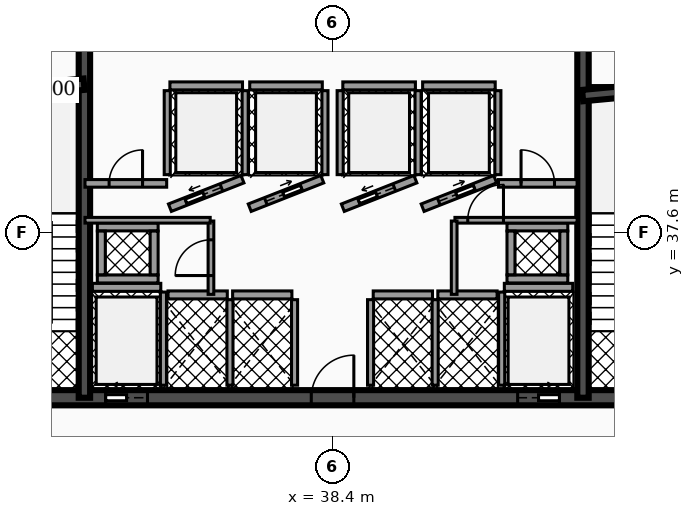
"""IFC4 building model, lengths in metres.
Left out: names, types, materials, properties, quantities, classifications, styles, units other than length and angle.
Written with IfcOpenShell. Run it as: python <this file> out.ifc"""

import sys

from ifc_helpers import new_model, si_unit, direction, frame, frame_2d, origin, place, context, subcontext, project, spatial, rectangle, extrude, element, fill, save


model = new_model("IFC4")
c1 = context("Model", 3, precision=1e-05, world=origin(), true_north=direction((0.0, 1.0)))
c2 = subcontext(c1, "Body", "Model", "MODEL_VIEW")
j1 = project(units=[si_unit("LENGTHUNIT", "METRE"), si_unit("PLANEANGLEUNIT", "RADIAN")], contexts=[c1])
p1 = place(None, origin())
s1 = spatial("IfcSite", under=j1, at=p1, CompositionType="ELEMENT")
p2 = place(p1, origin())
s2 = spatial("IfcBuilding", under=s1, at=p2, CompositionType="ELEMENT")
p3 = place(p2, frame((0.0, 0.0, 68.34)))
s3 = spatial("IfcBuildingStorey", under=s2, at=p3, CompositionType="ELEMENT", Elevation=68.34)
p4 = place(p3, frame((28.4, 33.25, 0.0), z_axis=(0.0, 0.0, 1.0), x_axis=(1.0, 0.0, 0.0)))
e1 = element("IfcWall", 1, at=p4, inside=s3, PredefinedType="SHEAR", context=c2, shape_type="SweptSolid", body=[
    extrude(rectangle(XDim=20.06, YDim=0.4, at=frame_2d((10.03, 0.0))), origin(), (0.0, 0.0, 1.0), 3.82),
])
p5 = place(p4, frame((4.03, 0.0, 0.0)))
e2 = element("IfcOpeningElement", 2, at=p5, cuts=e1, PredefinedType="OPENING", context=c2, shape_type="SweptSolid", body=[
    extrude(rectangle(XDim=1.1, YDim=2.15, at=frame_2d((0.55, 1.075))), frame((0.0, 0.21, 0.0), z_axis=(0.0, -1.0, 0.0), x_axis=(1.0, 0.0, 0.0)), (0.0, 0.0, 1.0), 0.42),
])
p6 = place(p4, frame((14.87, 0.0, 0.0)))
e3 = element("IfcOpeningElement", 3, at=p6, cuts=e1, PredefinedType="OPENING", context=c2, shape_type="SweptSolid", body=[
    extrude(rectangle(XDim=1.1, YDim=2.15, at=frame_2d((0.55, 1.075))), frame((0.0, 0.21, 0.0), z_axis=(0.0, -1.0, 0.0), x_axis=(1.0, 0.0, 0.0)), (0.0, 0.0, 1.0), 0.42),
])
p7 = place(p4, frame((1.31, 0.0, 0.0)))
e4 = element("IfcOpeningElement", 4, at=p7, cuts=e1, PredefinedType="OPENING", context=c2, shape_type="SweptSolid", body=[
    extrude(rectangle(XDim=1.1, YDim=2.2, at=frame_2d((0.55, 1.1))), frame((0.0, 0.21, 0.0), z_axis=(0.0, -1.0, 0.0), x_axis=(1.0, 0.0, 0.0)), (0.0, 0.0, 1.0), 0.42),
])
p8 = place(p4, frame((9.44, 0.0, 0.0)))
e5 = element("IfcOpeningElement", 5, at=p8, cuts=e1, PredefinedType="OPENING", context=c2, shape_type="SweptSolid", body=[
    extrude(rectangle(XDim=1.12, YDim=2.05, at=frame_2d((0.56, 1.025))), frame((0.0, 0.21, 0.0), z_axis=(0.0, -1.0, 0.0), x_axis=(1.0, 0.0, 0.0)), (0.0, 0.0, 1.0), 0.42),
])
p9 = place(p4, frame((17.65, 0.0, 0.0)))
e6 = element("IfcOpeningElement", 6, at=p9, cuts=e1, PredefinedType="OPENING", context=c2, shape_type="SweptSolid", body=[
    extrude(rectangle(XDim=1.1, YDim=2.2, at=frame_2d((0.55, 1.1))), frame((0.0, 0.21, 0.0), z_axis=(0.0, -1.0, 0.0), x_axis=(1.0, 0.0, 0.0)), (0.0, 0.0, 1.0), 0.42),
])
for number, where, z_axis, x_axis in (
    (7, (31.87, 33.25, 0.0), (0.0, 0.0, 1.0), (0.0, 1.0, 0.0)),
    (8, (44.99, 33.25, 0.0), (0.0, 0.0, 1.0), (0.0, 1.0, 0.0)),
):
    element("IfcWall", number, at=place(p3, frame(where, z_axis=z_axis, x_axis=x_axis)), inside=s3, PredefinedType="SHEAR", context=c2, shape_type="SweptSolid", body=[
        extrude(rectangle(XDim=10.2, YDim=0.3, at=frame_2d((5.1, 0.0))), origin(), (0.0, 0.0, 1.0), 3.82),
    ])
p10 = place(p3, frame((28.64, 41.2, 0.0), z_axis=(0.0, 0.0, 1.0), x_axis=(0.995687118776, 0.092774789157, 0.0)))
e9 = element("IfcWall", 9, at=p10, inside=s3, PredefinedType="SHEAR", context=c2, shape_type="SweptSolid", body=[
    extrude(rectangle(XDim=3.234, YDim=0.3, at=frame_2d((1.617, 0.0))), origin(), (0.0, 0.0, 1.0), 3.82),
])
p11 = place(p3, frame((44.98, 41.2, 0.0), z_axis=(0.0, 0.0, 1.0), x_axis=(0.995686468965, 0.09278176286, 0.0)))
e10 = element("IfcWall", 10, at=p11, inside=s3, PredefinedType="SHEAR", context=c2, shape_type="SweptSolid", body=[
    extrude(rectangle(XDim=3.234, YDim=0.3, at=frame_2d((1.617, 0.0))), origin(), (0.0, 0.0, 1.0), 3.82),
])
p12 = place(p3, frame((32.08, 36.155, 0.0), z_axis=(0.0, 0.0, 1.0), x_axis=(1.0, 0.0, 0.0)))
e11 = element("IfcWall", 11, at=p12, inside=s3, PredefinedType="SOLIDWALL", context=c2, shape_type="SweptSolid", body=[
    extrude(rectangle(XDim=1.8, YDim=0.21, at=frame_2d((0.9, 0.0))), origin(), (0.0, 0.0, 1.0), 2.792),
])
p13 = place(p3, frame((33.95, 33.58, 0.0), z_axis=(0.0, 0.0, 1.0), x_axis=(0.0, 1.0, 0.0)))
e12 = element("IfcWall", 12, at=p13, inside=s3, PredefinedType="SOLIDWALL", context=c2, shape_type="SweptSolid", body=[
    extrude(rectangle(XDim=2.45, YDim=0.16, at=frame_2d((1.225, 0.0))), origin(), (0.0, 0.0, 1.0), 2.792),
])
p14 = place(p3, frame((42.92, 36.155, 0.0), z_axis=(0.0, 0.0, 1.0), x_axis=(1.0, 0.0, 0.0)))
e13 = element("IfcWall", 13, at=p14, inside=s3, PredefinedType="SOLIDWALL", context=c2, shape_type="SweptSolid", body=[
    extrude(rectangle(XDim=1.8, YDim=0.21, at=frame_2d((0.9, 0.0))), origin(), (0.0, 0.0, 1.0), 2.792),
])
p15 = place(p3, frame((42.85, 33.58, 0.0), z_axis=(0.0, 0.0, 1.0), x_axis=(0.0, 1.0, 0.0)))
e14 = element("IfcWall", 14, at=p15, inside=s3, PredefinedType="SOLIDWALL", context=c2, shape_type="SweptSolid", body=[
    extrude(rectangle(XDim=2.45, YDim=0.16, at=frame_2d((1.225, 0.0))), origin(), (0.0, 0.0, 1.0), 2.792),
])
p16 = place(p3, frame((34.12, 38.25, 0.0), z_axis=(0.0, 0.0, 1.0), x_axis=(0.930804993012, 0.36551616241, 0.0)))
e15 = element("IfcWall", 15, at=p16, inside=s3, PredefinedType="SOLIDWALL", context=c2, shape_type="SweptSolid", body=[
    extrude(rectangle(XDim=2.052, YDim=0.21, at=frame_2d((1.026, 0.0))), origin(), (0.0, 0.0, 1.0), 2.792),
])
p17 = place(p16, frame((0.455, 0.0, 0.0)))
e16 = element("IfcOpeningElement", 16, at=p17, cuts=e15, PredefinedType="OPENING", context=c2, shape_type="SweptSolid", body=[
    extrude(rectangle(XDim=1.0, YDim=2.1, at=frame_2d((0.5, 1.05))), frame((0.0, 0.115, 0.0), z_axis=(0.0, -1.0, 0.0), x_axis=(1.0, 0.0, 0.0)), (0.0, 0.0, 1.0), 0.23),
])
p18 = place(p3, frame((34.12, 41.455, 0.0), z_axis=(0.0, 0.0, 1.0), x_axis=(1.0, 0.0, 0.0)))
e17 = element("IfcWall", 17, at=p18, inside=s3, PredefinedType="SOLIDWALL", context=c2, shape_type="SweptSolid", body=[
    extrude(rectangle(XDim=1.91, YDim=0.21, at=frame_2d((0.955, 0.0))), origin(), (0.0, 0.0, 1.0), 2.792),
])
for number, where, z_axis, x_axis in (
    (18, (34.05, 39.12, 0.0), (0.0, 0.0, 1.0), (0.0, 1.0, 0.0)),
    (19, (36.1, 39.12, 0.0), (0.0, 0.0, 1.0), (0.0, 1.0, 0.0)),
):
    element("IfcWall", number, at=place(p3, frame(where, z_axis=z_axis, x_axis=x_axis)), inside=s3, PredefinedType="SOLIDWALL", context=c2, shape_type="SweptSolid", body=[
        extrude(rectangle(XDim=2.21, YDim=0.16, at=frame_2d((1.105, 0.0))), origin(), (0.0, 0.0, 1.0), 2.792),
    ])
p19 = place(p3, frame((36.22, 38.25, 0.0), z_axis=(0.0, 0.0, 1.0), x_axis=(0.930804993012, 0.36551616241, 0.0)))
e20 = element("IfcWall", 20, at=p19, inside=s3, PredefinedType="SOLIDWALL", context=c2, shape_type="SweptSolid", body=[
    extrude(rectangle(XDim=2.052, YDim=0.21, at=frame_2d((1.026, 0.0))), origin(), (0.0, 0.0, 1.0), 2.792),
])
p20 = place(p19, frame((0.455, 0.0, 0.0)))
e21 = element("IfcOpeningElement", 21, at=p20, cuts=e20, PredefinedType="OPENING", context=c2, shape_type="SweptSolid", body=[
    extrude(rectangle(XDim=1.0, YDim=2.1, at=frame_2d((0.5, 1.05))), frame((0.0, 0.115, 0.0), z_axis=(0.0, -1.0, 0.0), x_axis=(1.0, 0.0, 0.0)), (0.0, 0.0, 1.0), 0.23),
])
p21 = place(p3, frame((36.22, 41.455, 0.0), z_axis=(0.0, 0.0, 1.0), x_axis=(1.0, 0.0, 0.0)))
e22 = element("IfcWall", 22, at=p21, inside=s3, PredefinedType="SOLIDWALL", context=c2, shape_type="SweptSolid", body=[
    extrude(rectangle(XDim=1.91, YDim=0.21, at=frame_2d((0.955, 0.0))), origin(), (0.0, 0.0, 1.0), 2.792),
])
p22 = place(p3, frame((38.2, 39.12, 0.0), z_axis=(0.0, 0.0, 1.0), x_axis=(0.0, 1.0, 0.0)))
e23 = element("IfcWall", 23, at=p22, inside=s3, PredefinedType="SOLIDWALL", context=c2, shape_type="SweptSolid", body=[
    extrude(rectangle(XDim=2.21, YDim=0.16, at=frame_2d((1.105, 0.0))), origin(), (0.0, 0.0, 1.0), 2.792),
])
p23 = place(p3, frame((38.67, 38.25, 0.0), z_axis=(0.0, 0.0, 1.0), x_axis=(0.930820886763, 0.3654756856, 0.0)))
e24 = element("IfcWall", 24, at=p23, inside=s3, PredefinedType="SOLIDWALL", context=c2, shape_type="SweptSolid", body=[
    extrude(rectangle(XDim=2.052, YDim=0.21, at=frame_2d((1.026, 0.0))), origin(), (0.0, 0.0, 1.0), 2.792),
])
p24 = place(p23, frame((0.455, 0.0, 0.0)))
e25 = element("IfcOpeningElement", 25, at=p24, cuts=e24, PredefinedType="OPENING", context=c2, shape_type="SweptSolid", body=[
    extrude(rectangle(XDim=1.0, YDim=2.1, at=frame_2d((0.5, 1.05))), frame((0.0, 0.115, 0.0), z_axis=(0.0, -1.0, 0.0), x_axis=(1.0, 0.0, 0.0)), (0.0, 0.0, 1.0), 0.23),
])
p25 = place(p3, frame((38.67, 41.455, 0.0), z_axis=(0.0, 0.0, 1.0), x_axis=(1.0, 0.0, 0.0)))
e26 = element("IfcWall", 26, at=p25, inside=s3, PredefinedType="SOLIDWALL", context=c2, shape_type="SweptSolid", body=[
    extrude(rectangle(XDim=1.91, YDim=0.21, at=frame_2d((0.955, 0.0))), origin(), (0.0, 0.0, 1.0), 2.792),
])
for number, where, z_axis, x_axis in (
    (27, (38.6, 39.12, 0.0), (0.0, 0.0, 1.0), (0.0, 1.0, 0.0)),
    (28, (40.65, 39.12, 0.0), (0.0, 0.0, 1.0), (0.0, 1.0, 0.0)),
):
    element("IfcWall", number, at=place(p3, frame(where, z_axis=z_axis, x_axis=x_axis)), inside=s3, PredefinedType="SOLIDWALL", context=c2, shape_type="SweptSolid", body=[
        extrude(rectangle(XDim=2.21, YDim=0.16, at=frame_2d((1.105, 0.0))), origin(), (0.0, 0.0, 1.0), 2.792),
    ])
p26 = place(p3, frame((40.77, 38.25, 0.0), z_axis=(0.0, 0.0, 1.0), x_axis=(0.930804993012, 0.36551616241, 0.0)))
e29 = element("IfcWall", 29, at=p26, inside=s3, PredefinedType="SOLIDWALL", context=c2, shape_type="SweptSolid", body=[
    extrude(rectangle(XDim=2.052, YDim=0.21, at=frame_2d((1.026, 0.0))), origin(), (0.0, 0.0, 1.0), 2.792),
])
p27 = place(p26, frame((0.455, 0.0, 0.0)))
e30 = element("IfcOpeningElement", 30, at=p27, cuts=e29, PredefinedType="OPENING", context=c2, shape_type="SweptSolid", body=[
    extrude(rectangle(XDim=1.0, YDim=2.1, at=frame_2d((0.5, 1.05))), frame((0.0, 0.115, 0.0), z_axis=(0.0, -1.0, 0.0), x_axis=(1.0, 0.0, 0.0)), (0.0, 0.0, 1.0), 0.23),
])
p28 = place(p3, frame((40.77, 41.455, 0.0), z_axis=(0.0, 0.0, 1.0), x_axis=(1.0, 0.0, 0.0)))
e31 = element("IfcWall", 31, at=p28, inside=s3, PredefinedType="SOLIDWALL", context=c2, shape_type="SweptSolid", body=[
    extrude(rectangle(XDim=1.91, YDim=0.21, at=frame_2d((0.955, 0.0))), origin(), (0.0, 0.0, 1.0), 2.792),
])
p29 = place(p3, frame((42.75, 39.12, 0.0), z_axis=(0.0, 0.0, 1.0), x_axis=(0.0, 1.0, 0.0)))
e32 = element("IfcWall", 32, at=p29, inside=s3, PredefinedType="SOLIDWALL", context=c2, shape_type="SweptSolid", body=[
    extrude(rectangle(XDim=2.21, YDim=0.16, at=frame_2d((1.105, 0.0))), origin(), (0.0, 0.0, 1.0), 2.792),
])
p30 = place(p3, frame((34.07, 35.955, 0.0), z_axis=(0.0, 0.0, 1.0), x_axis=(1.0, 0.0, 0.0)))
e33 = element("IfcWall", 33, at=p30, inside=s3, PredefinedType="SOLIDWALL", context=c2, shape_type="SweptSolid", body=[
    extrude(rectangle(XDim=1.56, YDim=0.21, at=frame_2d((0.78, 0.0))), origin(), (0.0, 0.0, 1.0), 2.792),
])
p31 = place(p3, frame((35.7, 33.58, 0.0), z_axis=(0.0, 0.0, 1.0), x_axis=(0.0, 1.0, 0.0)))
e34 = element("IfcWall", 34, at=p31, inside=s3, PredefinedType="SOLIDWALL", context=c2, shape_type="SweptSolid", body=[
    extrude(rectangle(XDim=2.25, YDim=0.16, at=frame_2d((1.125, 0.0))), origin(), (0.0, 0.0, 1.0), 2.792),
])
p32 = place(p3, frame((35.77, 35.955, 0.0), z_axis=(0.0, 0.0, 1.0), x_axis=(1.0, 0.0, 0.0)))
e35 = element("IfcWall", 35, at=p32, inside=s3, PredefinedType="SOLIDWALL", context=c2, shape_type="SweptSolid", body=[
    extrude(rectangle(XDim=1.56, YDim=0.21, at=frame_2d((0.78, 0.0))), origin(), (0.0, 0.0, 1.0), 2.792),
])
p33 = place(p3, frame((37.4, 33.58, 0.0), z_axis=(0.0, 0.0, 1.0), x_axis=(0.0, 1.0, 0.0)))
e36 = element("IfcWall", 36, at=p33, inside=s3, PredefinedType="SOLIDWALL", context=c2, shape_type="SweptSolid", body=[
    extrude(rectangle(XDim=2.25, YDim=0.16, at=frame_2d((1.125, 0.0))), origin(), (0.0, 0.0, 1.0), 2.792),
])
p34 = place(p3, frame((39.47, 35.955, 0.0), z_axis=(0.0, 0.0, 1.0), x_axis=(1.0, 0.0, 0.0)))
e37 = element("IfcWall", 37, at=p34, inside=s3, PredefinedType="SOLIDWALL", context=c2, shape_type="SweptSolid", body=[
    extrude(rectangle(XDim=1.56, YDim=0.21, at=frame_2d((0.78, 0.0))), origin(), (0.0, 0.0, 1.0), 2.792),
])
for number, where, z_axis, x_axis in (
    (38, (39.4, 33.58, 0.0), (0.0, 0.0, 1.0), (0.0, 1.0, 0.0)),
    (39, (41.1, 33.58, 0.0), (0.0, 0.0, 1.0), (0.0, 1.0, 0.0)),
):
    element("IfcWall", number, at=place(p3, frame(where, z_axis=z_axis, x_axis=x_axis)), inside=s3, PredefinedType="SOLIDWALL", context=c2, shape_type="SweptSolid", body=[
        extrude(rectangle(XDim=2.25, YDim=0.16, at=frame_2d((1.125, 0.0))), origin(), (0.0, 0.0, 1.0), 2.792),
    ])
p35 = place(p3, frame((41.17, 35.955, 0.0), z_axis=(0.0, 0.0, 1.0), x_axis=(1.0, 0.0, 0.0)))
e40 = element("IfcWall", 40, at=p35, inside=s3, PredefinedType="SOLIDWALL", context=c2, shape_type="SweptSolid", body=[
    extrude(rectangle(XDim=1.56, YDim=0.21, at=frame_2d((0.78, 0.0))), origin(), (0.0, 0.0, 1.0), 2.792),
])
for number, where, z_axis, x_axis in (
    (41, (32.21, 36.375, 0.0), (0.0, 0.0, 1.0), (1.0, 0.0, 0.0)),
    (42, (32.21, 37.745, 0.0), (0.0, 0.0, 1.0), (1.0, 0.0, 0.0)),
):
    element("IfcWall", number, at=place(p3, frame(where, z_axis=z_axis, x_axis=x_axis)), inside=s3, PredefinedType="SOLIDWALL", context=c2, shape_type="SweptSolid", body=[
        extrude(rectangle(XDim=1.6, YDim=0.21, at=frame_2d((0.8, 0.0))), origin(), (0.0, 0.0, 1.0), 3.82),
    ])
for number, where, z_axis, x_axis in (
    (43, (32.315, 36.485, 0.0), (0.0, 0.0, 1.0), (0.0, 1.0, 0.0)),
    (44, (33.705, 36.485, 0.0), (0.0, 0.0, 1.0), (0.0, 1.0, 0.0)),
):
    element("IfcWall", number, at=place(p3, frame(where, z_axis=z_axis, x_axis=x_axis)), inside=s3, PredefinedType="SOLIDWALL", context=c2, shape_type="SweptSolid", body=[
        extrude(rectangle(XDim=1.15, YDim=0.21, at=frame_2d((0.575, 0.0))), origin(), (0.0, 0.0, 1.0), 3.82),
    ])
for number, where, z_axis, x_axis in (
    (45, (42.99, 36.375, 0.0), (0.0, 0.0, 1.0), (1.0, 0.0, 0.0)),
    (46, (42.99, 37.745, 0.0), (0.0, 0.0, 1.0), (1.0, 0.0, 0.0)),
):
    element("IfcWall", number, at=place(p3, frame(where, z_axis=z_axis, x_axis=x_axis)), inside=s3, PredefinedType="SOLIDWALL", context=c2, shape_type="SweptSolid", body=[
        extrude(rectangle(XDim=1.6, YDim=0.21, at=frame_2d((0.8, 0.0))), origin(), (0.0, 0.0, 1.0), 3.82),
    ])
for number, where, z_axis, x_axis in (
    (47, (43.095, 36.485, 0.0), (0.0, 0.0, 1.0), (0.0, 1.0, 0.0)),
    (48, (44.485, 36.485, 0.0), (0.0, 0.0, 1.0), (0.0, 1.0, 0.0)),
):
    element("IfcWall", number, at=place(p3, frame(where, z_axis=z_axis, x_axis=x_axis)), inside=s3, PredefinedType="SOLIDWALL", context=c2, shape_type="SweptSolid", body=[
        extrude(rectangle(XDim=1.15, YDim=0.21, at=frame_2d((0.575, 0.0))), origin(), (0.0, 0.0, 1.0), 3.82),
    ])
p36 = place(p3, frame((35.2, 35.97, 0.0), z_axis=(0.0, 0.0, 1.0), x_axis=(0.0, 1.0, 0.0)))
e49 = element("IfcWall", 49, at=p36, inside=s3, PredefinedType="PARTITIONING", context=c2, shape_type="SweptSolid", body=[
    extrude(rectangle(XDim=1.93, YDim=0.15, at=frame_2d((0.965, 0.0))), origin(), (0.0, 0.0, 1.0), 2.777),
])
p37 = place(p36, frame((0.495, 0.0, 0.0)))
e50 = element("IfcOpeningElement", 50, at=p37, cuts=e49, PredefinedType="OPENING", context=c2, shape_type="SweptSolid", body=[
    extrude(rectangle(XDim=0.94, YDim=2.05, at=frame_2d((0.47, 1.025))), frame((0.0, 0.085, 0.0), z_axis=(0.0, -1.0, 0.0), x_axis=(1.0, 0.0, 0.0)), (0.0, 0.0, 1.0), 0.17),
])
p38 = place(p3, frame((31.885, 37.92, 0.0), z_axis=(0.0, 0.0, 1.0), x_axis=(1.0, 0.0, 0.0)))
e51 = element("IfcWall", 51, at=p38, inside=s3, PredefinedType="PARTITIONING", context=c2, shape_type="SweptSolid", body=[
    extrude(rectangle(XDim=3.295, YDim=0.15, at=frame_2d((1.647, 0.0))), origin(), (0.0, 0.0, 1.0), 2.777),
])
p39 = place(p3, frame((31.885, 38.89, 0.0), z_axis=(0.0, 0.0, 1.0), x_axis=(1.0, 0.0, 0.0)))
e52 = element("IfcWall", 52, at=p39, inside=s3, PredefinedType="PARTITIONING", context=c2, shape_type="SweptSolid", body=[
    extrude(rectangle(XDim=2.15, YDim=0.2, at=frame_2d((1.075, 0.0))), origin(), (0.0, 0.0, 1.0), 2.777),
])
p40 = place(p39, frame((0.635, 0.0, 0.0)))
e53 = element("IfcOpeningElement", 53, at=p40, cuts=e52, PredefinedType="OPENING", context=c2, shape_type="SweptSolid", body=[
    extrude(rectangle(XDim=0.88, YDim=2.05, at=frame_2d((0.44, 1.025))), frame((0.0, 0.11, 0.0), z_axis=(0.0, -1.0, 0.0), x_axis=(1.0, 0.0, 0.0)), (0.0, 0.0, 1.0), 0.22),
])
p41 = place(p3, frame((42.765, 38.89, 0.0), z_axis=(0.0, 0.0, 1.0), x_axis=(1.0, 0.0, 0.0)))
e54 = element("IfcWall", 54, at=p41, inside=s3, PredefinedType="PARTITIONING", context=c2, shape_type="SweptSolid", body=[
    extrude(rectangle(XDim=2.07, YDim=0.2, at=frame_2d((1.035, 0.0))), origin(), (0.0, 0.0, 1.0), 2.777),
])
p42 = place(p41, frame((0.595, 0.0, 0.0)))
e55 = element("IfcOpeningElement", 55, at=p42, cuts=e54, PredefinedType="OPENING", context=c2, shape_type="SweptSolid", body=[
    extrude(rectangle(XDim=0.88, YDim=2.05, at=frame_2d((0.44, 1.025))), frame((0.0, 0.11, 0.0), z_axis=(0.0, -1.0, 0.0), x_axis=(1.0, 0.0, 0.0)), (0.0, 0.0, 1.0), 0.22),
])
p43 = place(p3, frame((41.62, 37.92, 0.0), z_axis=(0.0, 0.0, 1.0), x_axis=(1.0, 0.0, 0.0)))
e56 = element("IfcWall", 56, at=p43, inside=s3, PredefinedType="PARTITIONING", context=c2, shape_type="SweptSolid", body=[
    extrude(rectangle(XDim=3.215, YDim=0.15, at=frame_2d((1.607, 0.0))), origin(), (0.0, 0.0, 1.0), 2.777),
])
p44 = place(p43, frame((0.337, 0.0, 0.0)))
e57 = element("IfcOpeningElement", 57, at=p44, cuts=e56, PredefinedType="OPENING", context=c2, shape_type="SweptSolid", body=[
    extrude(rectangle(XDim=0.94, YDim=2.05, at=frame_2d((0.47, 1.025))), frame((0.0, 0.085, 0.0), z_axis=(0.0, -1.0, 0.0), x_axis=(1.0, 0.0, 0.0)), (0.0, 0.0, 1.0), 0.17),
])
p45 = place(p3, frame((41.6, 35.97, 0.0), z_axis=(0.0, 0.0, 1.0), x_axis=(0.0, 1.0, 0.0)))
e58 = element("IfcWall", 58, at=p45, inside=s3, PredefinedType="PARTITIONING", context=c2, shape_type="SweptSolid", body=[
    extrude(rectangle(XDim=1.93, YDim=0.15, at=frame_2d((0.965, 0.0))), origin(), (0.0, 0.0, 1.0), 2.777),
])
p46 = place(p5, origin())
e59 = element("IfcDoor", 59, at=p46, inside=s3, OperationType="SLIDING_TO_LEFT", PredefinedType="DOOR", context=c2, shape_type="SweptSolid", body=[
    extrude(rectangle(XDim=1.1, YDim=2.15, at=frame_2d((0.55, 1.075))), frame((0.0, 0.025, 0.0), z_axis=(0.0, -1.0, 0.0), x_axis=(1.0, 0.0, 0.0)), (0.0, 0.0, 1.0), 0.05),
])
fill(e2, e59)
p47 = place(p6, origin())
e60 = element("IfcDoor", 60, at=p47, inside=s3, OperationType="SLIDING_TO_RIGHT", PredefinedType="DOOR", context=c2, shape_type="SweptSolid", body=[
    extrude(rectangle(XDim=1.1, YDim=2.15, at=frame_2d((0.55, 1.075))), frame((0.0, 0.025, 0.0), z_axis=(0.0, -1.0, 0.0), x_axis=(1.0, 0.0, 0.0)), (0.0, 0.0, 1.0), 0.05),
])
fill(e3, e60)
p48 = place(p17, origin())
e61 = element("IfcDoor", 61, at=p48, inside=s3, OperationType="SLIDING_TO_LEFT", PredefinedType="DOOR", context=c2, shape_type="SweptSolid", body=[
    extrude(rectangle(XDim=1.0, YDim=2.1, at=frame_2d((0.5, 1.05))), frame((0.0, 0.025, 0.0), z_axis=(0.0, -1.0, 0.0), x_axis=(1.0, 0.0, 0.0)), (0.0, 0.0, 1.0), 0.05),
])
fill(e16, e61)
p49 = place(p20, origin())
e62 = element("IfcDoor", 62, at=p49, inside=s3, OperationType="SLIDING_TO_RIGHT", PredefinedType="DOOR", context=c2, shape_type="SweptSolid", body=[
    extrude(rectangle(XDim=1.0, YDim=2.1, at=frame_2d((0.5, 1.05))), frame((0.0, 0.025, 0.0), z_axis=(0.0, -1.0, 0.0), x_axis=(1.0, 0.0, 0.0)), (0.0, 0.0, 1.0), 0.05),
])
fill(e21, e62)
p50 = place(p24, origin())
e63 = element("IfcDoor", 63, at=p50, inside=s3, OperationType="SLIDING_TO_LEFT", PredefinedType="DOOR", context=c2, shape_type="SweptSolid", body=[
    extrude(rectangle(XDim=1.0, YDim=2.1, at=frame_2d((0.5, 1.05))), frame((0.0, 0.025, 0.0), z_axis=(0.0, -1.0, 0.0), x_axis=(1.0, 0.0, 0.0)), (0.0, 0.0, 1.0), 0.05),
])
fill(e25, e63)
p51 = place(p27, origin())
e64 = element("IfcDoor", 64, at=p51, inside=s3, OperationType="SLIDING_TO_RIGHT", PredefinedType="DOOR", context=c2, shape_type="SweptSolid", body=[
    extrude(rectangle(XDim=1.0, YDim=2.1, at=frame_2d((0.5, 1.05))), frame((0.0, 0.025, 0.0), z_axis=(0.0, -1.0, 0.0), x_axis=(1.0, 0.0, 0.0)), (0.0, 0.0, 1.0), 0.05),
])
fill(e30, e64)
p52 = place(p8, origin())
e65 = element("IfcDoor", 65, at=p52, inside=s3, OperationType="SINGLE_SWING_RIGHT", PredefinedType="DOOR", context=c2, shape_type="SweptSolid", body=[
    extrude(rectangle(XDim=1.12, YDim=2.05, at=frame_2d((0.56, 1.025))), frame((0.0, 0.025, 0.0), z_axis=(0.0, -1.0, 0.0), x_axis=(1.0, 0.0, 0.0)), (0.0, 0.0, 1.0), 0.05),
])
fill(e5, e65)
p53 = place(p37, origin())
e66 = element("IfcDoor", 66, at=p53, inside=s3, OperationType="SINGLE_SWING_LEFT", PredefinedType="DOOR", context=c2, shape_type="SweptSolid", body=[
    extrude(rectangle(XDim=0.94, YDim=2.05, at=frame_2d((0.47, 1.025))), frame((0.0, 0.025, 0.0), z_axis=(0.0, -1.0, 0.0), x_axis=(1.0, 0.0, 0.0)), (0.0, 0.0, 1.0), 0.05),
])
fill(e50, e66)
p54 = place(p40, origin())
e67 = element("IfcDoor", 67, at=p54, inside=s3, OperationType="SINGLE_SWING_RIGHT", PredefinedType="DOOR", context=c2, shape_type="SweptSolid", body=[
    extrude(rectangle(XDim=0.88, YDim=2.05, at=frame_2d((0.44, 1.025))), frame((0.0, 0.025, 0.0), z_axis=(0.0, -1.0, 0.0), x_axis=(1.0, 0.0, 0.0)), (0.0, 0.0, 1.0), 0.05),
])
fill(e53, e67)
p55 = place(p42, origin())
e68 = element("IfcDoor", 68, at=p55, inside=s3, OperationType="SINGLE_SWING_LEFT", PredefinedType="DOOR", context=c2, shape_type="SweptSolid", body=[
    extrude(rectangle(XDim=0.88, YDim=2.05, at=frame_2d((0.44, 1.025))), frame((0.0, 0.025, 0.0), z_axis=(0.0, -1.0, 0.0), x_axis=(1.0, 0.0, 0.0)), (0.0, 0.0, 1.0), 0.05),
])
fill(e55, e68)
p56 = place(p44, origin())
e69 = element("IfcDoor", 69, at=p56, inside=s3, OperationType="SINGLE_SWING_RIGHT", PredefinedType="DOOR", context=c2, shape_type="SweptSolid", body=[
    extrude(rectangle(XDim=0.94, YDim=2.05, at=frame_2d((0.47, 1.025))), frame((0.0, 0.025, 0.0), z_axis=(0.0, -1.0, 0.0), x_axis=(1.0, 0.0, 0.0)), (0.0, 0.0, 1.0), 0.05),
])
fill(e57, e69)
save(model, sys.argv[1])
